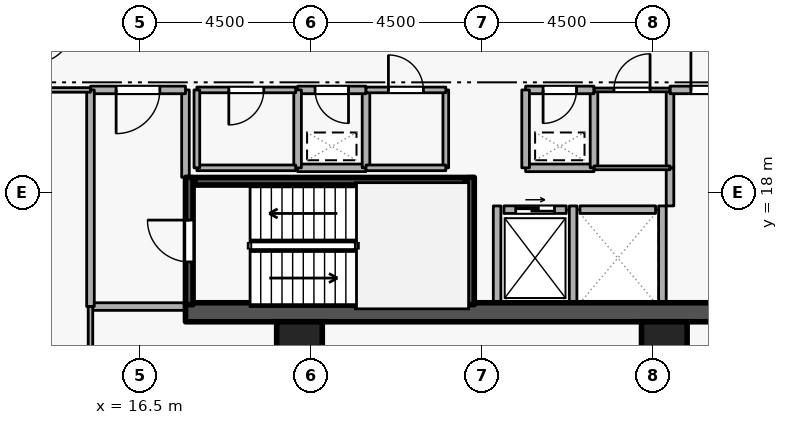
"""IFC4 building model, lengths in metres.
Left out: names, types, materials, properties, quantities, classifications, styles, units other than length and angle.
Written with IfcOpenShell. Run it as: python <this file> out.ifc"""

import sys

from ifc_helpers import new_model, si_unit, direction, frame, frame_2d, origin, origin_2d, place, context, subcontext, project, spatial, rectangle, extrude, element, fill, save


model = new_model("IFC4")
c1 = context("Model", 3, precision=1e-05, world=origin(), true_north=direction((0.0, 1.0)))
c2 = subcontext(c1, "Body", "Model", "MODEL_VIEW")
j1 = project(units=[si_unit("LENGTHUNIT", "METRE"), si_unit("PLANEANGLEUNIT", "RADIAN")], contexts=[c1])
p1 = place(None, origin())
s1 = spatial("IfcSite", under=j1, at=p1, CompositionType="ELEMENT")
p2 = place(p1, origin())
s2 = spatial("IfcBuilding", under=s1, at=p2, CompositionType="ELEMENT")
p3 = place(p2, frame((0.0, 0.0, 134.1)))
s3 = spatial("IfcBuildingStorey", under=s2, at=p3, CompositionType="ELEMENT", Elevation=134.1)
p4 = place(p3, frame((17.7, 14.85, 0.0), z_axis=(0.0, 0.0, 1.0), x_axis=(1.0, 0.0, 0.0)))
e1 = element("IfcWall", 1, at=p4, inside=s3, PredefinedType="SHEAR", context=c2, shape_type="SweptSolid", body=[
    extrude(rectangle(XDim=15.6, YDim=0.5, at=frame_2d((7.8, 0.0))), origin(), (0.0, 0.0, 1.0), 3.6),
])
for number, where, z_axis, x_axis in (
    (2, (20.7, 14.0, 0.0), (0.0, 0.0, 1.0), (1.0, 0.0, 0.0)),
    (3, (30.3, 14.0, 0.0), (0.0, 0.0, 1.0), (1.0, 0.0, 0.0)),
):
    element("IfcColumn", number, at=place(p3, frame(where, z_axis=z_axis, x_axis=x_axis)), inside=s3, PredefinedType="COLUMN", context=c2, shape_type="SweptSolid", body=[
        extrude(rectangle(XDim=1.2, YDim=1.2, at=origin_2d()), origin(), (0.0, 0.0, 1.0), 3.6),
    ])
p5 = place(p3, frame((26.08, 17.55, 0.0), z_axis=(0.0, 0.0, 1.0), x_axis=(1.0, 0.0, 0.0)))
e4 = element("IfcWall", 4, at=p5, inside=s3, PredefinedType="STANDARD", context=c2, shape_type="SweptSolid", body=[
    extrude(rectangle(XDim=1.64, YDim=0.2, at=frame_2d((0.82, 0.0))), origin(), (0.0, 0.0, 1.0), 3.34),
])
p6 = place(p5, frame((0.31, 0.0, 0.0)))
e5 = element("IfcOpeningElement", 5, at=p6, cuts=e4, PredefinedType="OPENING", context=c2, shape_type="SweptSolid", body=[
    extrude(rectangle(XDim=1.02, YDim=2.06, at=frame_2d((0.51, 1.03))), frame((0.0, 0.11, 0.0), z_axis=(0.0, -1.0, 0.0), x_axis=(1.0, 0.0, 0.0)), (0.0, 0.0, 1.0), 0.22),
])
p7 = place(p3, frame((28.08, 17.55, 0.0), z_axis=(0.0, 0.0, 1.0), x_axis=(1.0, 0.0, 0.0)))
e6 = element("IfcWall", 6, at=p7, inside=s3, PredefinedType="STANDARD", context=c2, shape_type="SweptSolid", body=[
    extrude(rectangle(XDim=1.99, YDim=0.2, at=frame_2d((0.995, 0.0))), origin(), (0.0, 0.0, 1.0), 3.34),
])
for number, where, z_axis, x_axis in (
    (7, (27.9, 15.112, 0.0), (0.0, 0.0, 1.0), (0.0, 1.0, 0.0)),
    (8, (25.9, 15.112, 0.0), (0.0, 0.0, 1.0), (0.0, 1.0, 0.0)),
    (9, (30.25, 15.112, 0.0), (0.0, 0.0, 1.0), (0.0, 1.0, 0.0)),
):
    element("IfcWall", number, at=place(p3, frame(where, z_axis=z_axis, x_axis=x_axis)), inside=s3, PredefinedType="STANDARD", context=c2, shape_type="SweptSolid", body=[
        extrude(rectangle(XDim=2.536, YDim=0.2, at=frame_2d((1.268, 0.0))), origin(), (0.0, 0.0, 1.0), 3.34),
    ])
p8 = place(p3, frame((17.8, 15.05, 0.0), z_axis=(0.0, 0.0, 1.0), x_axis=(0.0, 1.0, 0.0)))
e10 = element("IfcWall", 10, at=p8, inside=s3, PredefinedType="SHEAR", context=c2, shape_type="SweptSolid", body=[
    extrude(rectangle(XDim=3.35, YDim=0.2, at=frame_2d((1.675, 0.0))), origin(), (0.0, 0.0, 1.0), 3.6),
])
p9 = place(p8, frame((1.125, 0.0, 0.0)))
e11 = element("IfcOpeningElement", 11, at=p9, cuts=e10, PredefinedType="OPENING", context=c2, shape_type="SweptSolid", body=[
    extrude(rectangle(XDim=1.1, YDim=2.1, at=frame_2d((0.55, 1.05))), frame((0.0, 0.11, 0.0), z_axis=(0.0, -1.0, 0.0), x_axis=(1.0, 0.0, 0.0)), (0.0, 0.0, 1.0), 0.22),
])
p10 = place(p3, frame((25.2, 18.4, 0.0), z_axis=(0.0, 0.0, 1.0), x_axis=(0.0, -1.0, 0.0)))
e12 = element("IfcWall", 12, at=p10, inside=s3, PredefinedType="SHEAR", context=c2, shape_type="SweptSolid", body=[
    extrude(rectangle(XDim=3.35, YDim=0.2, at=frame_2d((1.675, 0.0))), origin(), (0.0, 0.0, 1.0), 3.6),
])
p11 = place(p3, frame((25.05, 18.297, 0.0), z_axis=(0.0, 0.0, 1.0), x_axis=(-1.0, 0.0, 0.0)))
e13 = element("IfcWall", 13, at=p11, inside=s3, PredefinedType="SHEAR", context=c2, shape_type="SweptSolid", body=[
    extrude(rectangle(XDim=7.1, YDim=0.2, at=frame_2d((3.55, 0.0))), origin(), (0.0, 0.0, 1.0), 3.6),
])
p12 = place(p3, frame((15.2, 15.0, 0.0), z_axis=(0.0, 0.0, 1.0), x_axis=(1.0, 0.0, 0.0)))
e14 = element("IfcWall", 14, at=p12, inside=s3, PredefinedType="STANDARD", context=c2, shape_type="SweptSolid", body=[
    extrude(rectangle(XDim=2.5, YDim=0.2, at=frame_2d((1.25, 0.0))), origin(), (0.0, 0.0, 1.0), 3.34),
])
p13 = place(p3, frame((17.7, 18.4, 0.0), z_axis=(0.0, 0.0, 1.0), x_axis=(0.0, 1.0, 0.0)))
e15 = element("IfcWall", 15, at=p13, inside=s3, PredefinedType="STANDARD", context=c2, shape_type="SweptSolid", body=[
    extrude(rectangle(XDim=2.3, YDim=0.2, at=frame_2d((1.15, 0.0))), origin(), (0.0, 0.0, 1.0), 2.545),
])
p14 = place(p3, frame((17.7, 20.7, 0.0), z_axis=(0.0, 0.0, 1.0), x_axis=(-1.0, 0.0, 0.0)))
e16 = element("IfcWall", 16, at=p14, inside=s3, PredefinedType="STANDARD", context=c2, shape_type="SweptSolid", body=[
    extrude(rectangle(XDim=2.5, YDim=0.2, at=frame_2d((1.25, 0.0))), origin(), (0.0, 0.0, 1.0), 3.34),
])
p15 = place(p14, frame((0.675, 0.0, 0.0)))
e17 = element("IfcOpeningElement", 17, at=p15, cuts=e16, PredefinedType="OPENING", context=c2, shape_type="SweptSolid", body=[
    extrude(rectangle(XDim=1.15, YDim=2.1, at=frame_2d((0.575, 1.05))), frame((0.0, 0.11, 0.0), z_axis=(0.0, -1.0, 0.0), x_axis=(1.0, 0.0, 0.0)), (0.0, 0.0, 1.0), 0.22),
])
p16 = place(p3, frame((15.2, 20.7, 0.0), z_axis=(0.0, 0.0, 1.0), x_axis=(0.0, -1.0, 0.0)))
e18 = element("IfcWall", 18, at=p16, inside=s3, PredefinedType="STANDARD", context=c2, shape_type="SweptSolid", body=[
    extrude(rectangle(XDim=5.7, YDim=0.2, at=frame_2d((2.85, 0.0))), origin(), (0.0, 0.0, 1.0), 3.34),
])
p17 = place(p3, frame((26.65, 18.65, 0.0), z_axis=(0.0, 0.0, 1.0), x_axis=(1.0, 0.0, 0.0)))
e19 = element("IfcWall", 19, at=p17, inside=s3, PredefinedType="STANDARD", context=c2, shape_type="SweptSolid", body=[
    extrude(rectangle(XDim=1.8, YDim=0.2, at=frame_2d((0.9, 0.0))), origin(), (0.0, 0.0, 1.0), 3.34),
])
p18 = place(p3, frame((28.45, 18.65, 0.0), z_axis=(0.0, 0.0, 1.0), x_axis=(0.0, 1.0, 0.0)))
e20 = element("IfcWall", 20, at=p18, inside=s3, PredefinedType="STANDARD", context=c2, shape_type="SweptSolid", body=[
    extrude(rectangle(XDim=2.05, YDim=0.2, at=frame_2d((1.025, 0.0))), origin(), (0.0, 0.0, 1.0), 3.34),
])
p19 = place(p3, frame((28.45, 20.7, 0.0), z_axis=(0.0, 0.0, 1.0), x_axis=(-1.0, 0.0, 0.0)))
e21 = element("IfcWall", 21, at=p19, inside=s3, PredefinedType="STANDARD", context=c2, shape_type="SweptSolid", body=[
    extrude(rectangle(XDim=1.8, YDim=0.2, at=frame_2d((0.9, 0.0))), origin(), (0.0, 0.0, 1.0), 3.34),
])
p20 = place(p19, frame((0.46, 0.0, 0.0)))
e22 = element("IfcOpeningElement", 22, at=p20, cuts=e21, PredefinedType="OPENING", context=c2, shape_type="SweptSolid", body=[
    extrude(rectangle(XDim=0.88, YDim=2.04, at=frame_2d((0.44, 1.02))), frame((0.0, 0.11, 0.0), z_axis=(0.0, -1.0, 0.0), x_axis=(1.0, 0.0, 0.0)), (0.0, 0.0, 1.0), 0.22),
])
p21 = place(p3, frame((26.65, 20.7, 0.0), z_axis=(0.0, 0.0, 1.0), x_axis=(0.0, -1.0, 0.0)))
e23 = element("IfcWall", 23, at=p21, inside=s3, PredefinedType="STANDARD", context=c2, shape_type="SweptSolid", body=[
    extrude(rectangle(XDim=2.05, YDim=0.2, at=frame_2d((1.025, 0.0))), origin(), (0.0, 0.0, 1.0), 3.34),
])
p22 = place(p3, frame((20.65, 18.65, 0.0), z_axis=(0.0, 0.0, 1.0), x_axis=(1.0, 0.0, 0.0)))
e24 = element("IfcWall", 24, at=p22, inside=s3, PredefinedType="STANDARD", context=c2, shape_type="SweptSolid", body=[
    extrude(rectangle(XDim=1.8, YDim=0.2, at=frame_2d((0.9, 0.0))), origin(), (0.0, 0.0, 1.0), 3.34),
])
p23 = place(p3, frame((22.45, 18.65, 0.0), z_axis=(0.0, 0.0, 1.0), x_axis=(0.0, 1.0, 0.0)))
e25 = element("IfcWall", 25, at=p23, inside=s3, PredefinedType="STANDARD", context=c2, shape_type="SweptSolid", body=[
    extrude(rectangle(XDim=2.05, YDim=0.2, at=frame_2d((1.025, 0.0))), origin(), (0.0, 0.0, 1.0), 3.34),
])
p24 = place(p3, frame((22.45, 20.7, 0.0), z_axis=(0.0, 0.0, 1.0), x_axis=(-1.0, 0.0, 0.0)))
e26 = element("IfcWall", 26, at=p24, inside=s3, PredefinedType="STANDARD", context=c2, shape_type="SweptSolid", body=[
    extrude(rectangle(XDim=1.8, YDim=0.2, at=frame_2d((0.9, 0.0))), origin(), (0.0, 0.0, 1.0), 3.34),
])
p25 = place(p24, frame((0.46, 0.0, 0.0)))
e27 = element("IfcOpeningElement", 27, at=p25, cuts=e26, PredefinedType="OPENING", context=c2, shape_type="SweptSolid", body=[
    extrude(rectangle(XDim=0.88, YDim=2.04, at=frame_2d((0.44, 1.02))), frame((0.0, 0.11, 0.0), z_axis=(0.0, -1.0, 0.0), x_axis=(1.0, 0.0, 0.0)), (0.0, 0.0, 1.0), 0.22),
])
p26 = place(p3, frame((20.65, 20.7, 0.0), z_axis=(0.0, 0.0, 1.0), x_axis=(0.0, -1.0, 0.0)))
e28 = element("IfcWall", 28, at=p26, inside=s3, PredefinedType="STANDARD", context=c2, shape_type="SweptSolid", body=[
    extrude(rectangle(XDim=2.05, YDim=0.2, at=frame_2d((1.025, 0.0))), origin(), (0.0, 0.0, 1.0), 3.34),
])
p27 = place(p3, frame((30.45, 17.648, 0.0), z_axis=(0.0, 0.0, 1.0), x_axis=(0.0, 1.0, 0.0)))
e29 = element("IfcWall", 29, at=p27, inside=s3, PredefinedType="STANDARD", context=c2, shape_type="SweptSolid", body=[
    extrude(rectangle(XDim=1.002, YDim=0.2, at=frame_2d((0.501, 0.0))), origin(), (0.0, 0.0, 1.0), 3.34),
])
p28 = place(p3, frame((30.45, 18.65, 0.0), z_axis=(0.0, 0.0, 1.0), x_axis=(0.0, 1.0, 0.0)))
e30 = element("IfcWall", 30, at=p28, inside=s3, PredefinedType="STANDARD", context=c2, shape_type="SweptSolid", body=[
    extrude(rectangle(XDim=2.05, YDim=0.2, at=frame_2d((1.025, 0.0))), origin(), (0.0, 0.0, 1.0), 3.34),
])
p29 = place(p3, frame((30.45, 20.7, 0.0), z_axis=(0.0, 0.0, 1.0), x_axis=(1.0, 0.0, 0.0)))
e31 = element("IfcWall", 31, at=p29, inside=s3, PredefinedType="STANDARD", context=c2, shape_type="SweptSolid", body=[
    extrude(rectangle(XDim=2.25, YDim=0.2, at=frame_2d((1.125, 0.0))), origin(), (0.0, 0.0, 1.0), 3.34),
])
p30 = place(p29, frame((0.55, 0.0, 0.0)))
e32 = element("IfcOpeningElement", 32, at=p30, cuts=e31, PredefinedType="OPENING", context=c2, shape_type="SweptSolid", body=[
    extrude(rectangle(XDim=1.15, YDim=2.1, at=frame_2d((0.575, 1.05))), frame((0.0, 0.11, 0.0), z_axis=(0.0, -1.0, 0.0), x_axis=(1.0, 0.0, 0.0)), (0.0, 0.0, 1.0), 0.22),
])
p31 = place(p3, frame((18.0, 18.65, 0.0), z_axis=(0.0, 0.0, 1.0), x_axis=(1.0, 0.0, 0.0)))
e33 = element("IfcWall", 33, at=p31, inside=s3, PredefinedType="PARTITIONING", context=c2, shape_type="SweptSolid", body=[
    extrude(rectangle(XDim=2.6, YDim=0.15, at=frame_2d((1.3, 0.0))), origin(), (0.0, 0.0, 1.0), 3.34),
])
p32 = place(p3, frame((20.6, 20.7, 0.0), z_axis=(0.0, 0.0, 1.0), x_axis=(-1.0, 0.0, 0.0)))
e34 = element("IfcWall", 34, at=p32, inside=s3, PredefinedType="PARTITIONING", context=c2, shape_type="SweptSolid", body=[
    extrude(rectangle(XDim=2.6, YDim=0.15, at=frame_2d((1.3, 0.0))), origin(), (0.0, 0.0, 1.0), 3.34),
])
p33 = place(p32, frame((0.84, 0.0, 0.0)))
e35 = element("IfcOpeningElement", 35, at=p33, cuts=e34, PredefinedType="OPENING", context=c2, shape_type="SweptSolid", body=[
    extrude(rectangle(XDim=0.92, YDim=2.08, at=frame_2d((0.46, 1.04))), frame((0.0, 0.085, 0.0), z_axis=(0.0, -1.0, 0.0), x_axis=(1.0, 0.0, 0.0)), (0.0, 0.0, 1.0), 0.17),
])
p34 = place(p3, frame((18.0, 20.7, 0.0), z_axis=(0.0, 0.0, 1.0), x_axis=(0.0, -1.0, 0.0)))
e36 = element("IfcWall", 36, at=p34, inside=s3, PredefinedType="PARTITIONING", context=c2, shape_type="SweptSolid", body=[
    extrude(rectangle(XDim=2.05, YDim=0.15, at=frame_2d((1.025, 0.0))), origin(), (0.0, 0.0, 1.0), 2.545),
])
p35 = place(p3, frame((24.55, 20.7, 0.0), z_axis=(0.0, 0.0, 1.0), x_axis=(0.0, -1.0, 0.0)))
e37 = element("IfcWall", 37, at=p35, inside=s3, PredefinedType="PARTITIONING", context=c2, shape_type="SweptSolid", body=[
    extrude(rectangle(XDim=2.05, YDim=0.15, at=frame_2d((1.025, 0.0))), origin(), (0.0, 0.0, 1.0), 3.34),
])
p36 = place(p3, frame((24.55, 18.65, 0.0), z_axis=(0.0, 0.0, 1.0), x_axis=(-1.0, 0.0, 0.0)))
e38 = element("IfcWall", 38, at=p36, inside=s3, PredefinedType="PARTITIONING", context=c2, shape_type="SweptSolid", body=[
    extrude(rectangle(XDim=2.1, YDim=0.15, at=frame_2d((1.05, 0.0))), origin(), (0.0, 0.0, 1.0), 3.34),
])
p37 = place(p3, frame((22.45, 20.7, 0.0), z_axis=(0.0, 0.0, 1.0), x_axis=(1.0, 0.0, 0.0)))
e39 = element("IfcWall", 39, at=p37, inside=s3, PredefinedType="PARTITIONING", context=c2, shape_type="SweptSolid", body=[
    extrude(rectangle(XDim=2.1, YDim=0.15, at=frame_2d((1.05, 0.0))), origin(), (0.0, 0.0, 1.0), 3.34),
])
p38 = place(p37, frame((0.59, 0.0, 0.0)))
e40 = element("IfcOpeningElement", 40, at=p38, cuts=e39, PredefinedType="OPENING", context=c2, shape_type="SweptSolid", body=[
    extrude(rectangle(XDim=0.92, YDim=2.08, at=frame_2d((0.46, 1.04))), frame((0.0, 0.085, 0.0), z_axis=(0.0, -1.0, 0.0), x_axis=(1.0, 0.0, 0.0)), (0.0, 0.0, 1.0), 0.17),
])
p39 = place(p3, frame((30.45, 18.65, 0.0), z_axis=(0.0, 0.0, 1.0), x_axis=(-1.0, 0.0, 0.0)))
e41 = element("IfcWall", 41, at=p39, inside=s3, PredefinedType="PARTITIONING", context=c2, shape_type="SweptSolid", body=[
    extrude(rectangle(XDim=2.0, YDim=0.1, at=frame_2d((1.0, 0.0))), origin(), (0.0, 0.0, 1.0), 3.34),
])
p40 = place(p3, frame((28.45, 20.7, 0.0), z_axis=(0.0, 0.0, 1.0), x_axis=(1.0, 0.0, 0.0)))
e42 = element("IfcWall", 42, at=p40, inside=s3, PredefinedType="PARTITIONING", context=c2, shape_type="SweptSolid", body=[
    extrude(rectangle(XDim=2.0, YDim=0.1, at=frame_2d((1.0, 0.0))), origin(), (0.0, 0.0, 1.0), 3.34),
])
p41 = place(p40, frame((0.525, 0.0, 0.0)))
e43 = element("IfcOpeningElement", 43, at=p41, cuts=e42, PredefinedType="OPENING", context=c2, shape_type="SweptSolid", body=[
    extrude(rectangle(XDim=0.95, YDim=2.1, at=frame_2d((0.475, 1.05))), frame((0.0, 0.06, 0.0), z_axis=(0.0, -1.0, 0.0), x_axis=(1.0, 0.0, 0.0)), (0.0, 0.0, 1.0), 0.12),
])
p42 = place(p3, frame((13.25, 20.7, 0.0), z_axis=(0.0, 0.0, 1.0), x_axis=(1.0, 0.0, 0.0)))
e44 = element("IfcWall", 44, at=p42, inside=s3, PredefinedType="PARTITIONING", context=c2, shape_type="SweptSolid", body=[
    extrude(rectangle(XDim=1.95, YDim=0.12, at=frame_2d((0.975, 0.0))), origin(), (0.0, 0.0, 1.0), 3.34),
])
p43 = place(p3, frame((15.2, 15.0, 0.0), z_axis=(0.0, 0.0, 1.0), x_axis=(0.0, -1.0, 0.0)))
e45 = element("IfcWall", 45, at=p43, inside=s3, PredefinedType="PARTITIONING", context=c2, shape_type="SweptSolid", body=[
    extrude(rectangle(XDim=11.72, YDim=0.12, at=frame_2d((5.86, 0.0))), origin(), (0.0, 0.0, 1.0), 3.34),
])
p44 = place(p6, origin())
e46 = element("IfcDoor", 46, at=p44, inside=s3, OperationType="SLIDING_TO_LEFT", PredefinedType="DOOR", context=c2, shape_type="SweptSolid", body=[
    extrude(rectangle(XDim=1.02, YDim=2.06, at=frame_2d((0.51, 1.03))), frame((0.0, 0.025, 0.0), z_axis=(0.0, -1.0, 0.0), x_axis=(1.0, 0.0, 0.0)), (0.0, 0.0, 1.0), 0.05),
])
fill(e5, e46)
p45 = place(p9, origin())
e47 = element("IfcDoor", 47, at=p45, inside=s3, OperationType="SINGLE_SWING_RIGHT", PredefinedType="DOOR", context=c2, shape_type="SweptSolid", body=[
    extrude(rectangle(XDim=1.1, YDim=2.1, at=frame_2d((0.55, 1.05))), frame((0.0, 0.025, 0.0), z_axis=(0.0, -1.0, 0.0), x_axis=(1.0, 0.0, 0.0)), (0.0, 0.0, 1.0), 0.05),
])
fill(e11, e47)
p46 = place(p15, origin())
e48 = element("IfcDoor", 48, at=p46, inside=s3, OperationType="SINGLE_SWING_RIGHT", PredefinedType="DOOR", context=c2, shape_type="SweptSolid", body=[
    extrude(rectangle(XDim=1.15, YDim=2.1, at=frame_2d((0.575, 1.05))), frame((0.0, 0.025, 0.0), z_axis=(0.0, -1.0, 0.0), x_axis=(1.0, 0.0, 0.0)), (0.0, 0.0, 1.0), 0.05),
])
fill(e17, e48)
p47 = place(p20, origin())
e49 = element("IfcDoor", 49, at=p47, inside=s3, OperationType="SINGLE_SWING_RIGHT", PredefinedType="DOOR", context=c2, shape_type="SweptSolid", body=[
    extrude(rectangle(XDim=0.88, YDim=2.04, at=frame_2d((0.44, 1.02))), frame((0.0, 0.025, 0.0), z_axis=(0.0, -1.0, 0.0), x_axis=(1.0, 0.0, 0.0)), (0.0, 0.0, 1.0), 0.05),
])
fill(e22, e49)
p48 = place(p25, origin())
e50 = element("IfcDoor", 50, at=p48, inside=s3, OperationType="SINGLE_SWING_LEFT", PredefinedType="DOOR", context=c2, shape_type="SweptSolid", body=[
    extrude(rectangle(XDim=0.88, YDim=2.04, at=frame_2d((0.44, 1.02))), frame((0.0, 0.025, 0.0), z_axis=(0.0, -1.0, 0.0), x_axis=(1.0, 0.0, 0.0)), (0.0, 0.0, 1.0), 0.05),
])
fill(e27, e50)
p49 = place(p33, origin())
e51 = element("IfcDoor", 51, at=p49, inside=s3, OperationType="SINGLE_SWING_RIGHT", PredefinedType="DOOR", context=c2, shape_type="SweptSolid", body=[
    extrude(rectangle(XDim=0.92, YDim=2.08, at=frame_2d((0.46, 1.04))), frame((0.0, 0.025, 0.0), z_axis=(0.0, -1.0, 0.0), x_axis=(1.0, 0.0, 0.0)), (0.0, 0.0, 1.0), 0.05),
])
fill(e35, e51)
p50 = place(p38, origin())
e52 = element("IfcDoor", 52, at=p50, inside=s3, OperationType="SINGLE_SWING_LEFT", PredefinedType="DOOR", context=c2, shape_type="SweptSolid", body=[
    extrude(rectangle(XDim=0.92, YDim=2.08, at=frame_2d((0.46, 1.04))), frame((0.0, 0.025, 0.0), z_axis=(0.0, -1.0, 0.0), x_axis=(1.0, 0.0, 0.0)), (0.0, 0.0, 1.0), 0.05),
])
fill(e40, e52)
p51 = place(p41, origin())
e53 = element("IfcDoor", 53, at=p51, inside=s3, OperationType="SINGLE_SWING_RIGHT", PredefinedType="DOOR", context=c2, shape_type="SweptSolid", body=[
    extrude(rectangle(XDim=0.95, YDim=2.1, at=frame_2d((0.475, 1.05))), frame((0.0, 0.025, 0.0), z_axis=(0.0, -1.0, 0.0), x_axis=(1.0, 0.0, 0.0)), (0.0, 0.0, 1.0), 0.05),
])
fill(e43, e53)
p52 = place(p30, origin())
e54 = element("IfcDoor", 54, at=p52, inside=s3, OperationType="SINGLE_SWING_LEFT", PredefinedType="DOOR", context=c2, shape_type="SweptSolid", body=[
    extrude(rectangle(XDim=1.15, YDim=2.1, at=frame_2d((0.575, 1.05))), frame((0.0, 0.025, 0.0), z_axis=(0.0, -1.0, 0.0), x_axis=(1.0, 0.0, 0.0)), (0.0, 0.0, 1.0), 0.05),
])
fill(e32, e54)
save(model, sys.argv[1])
